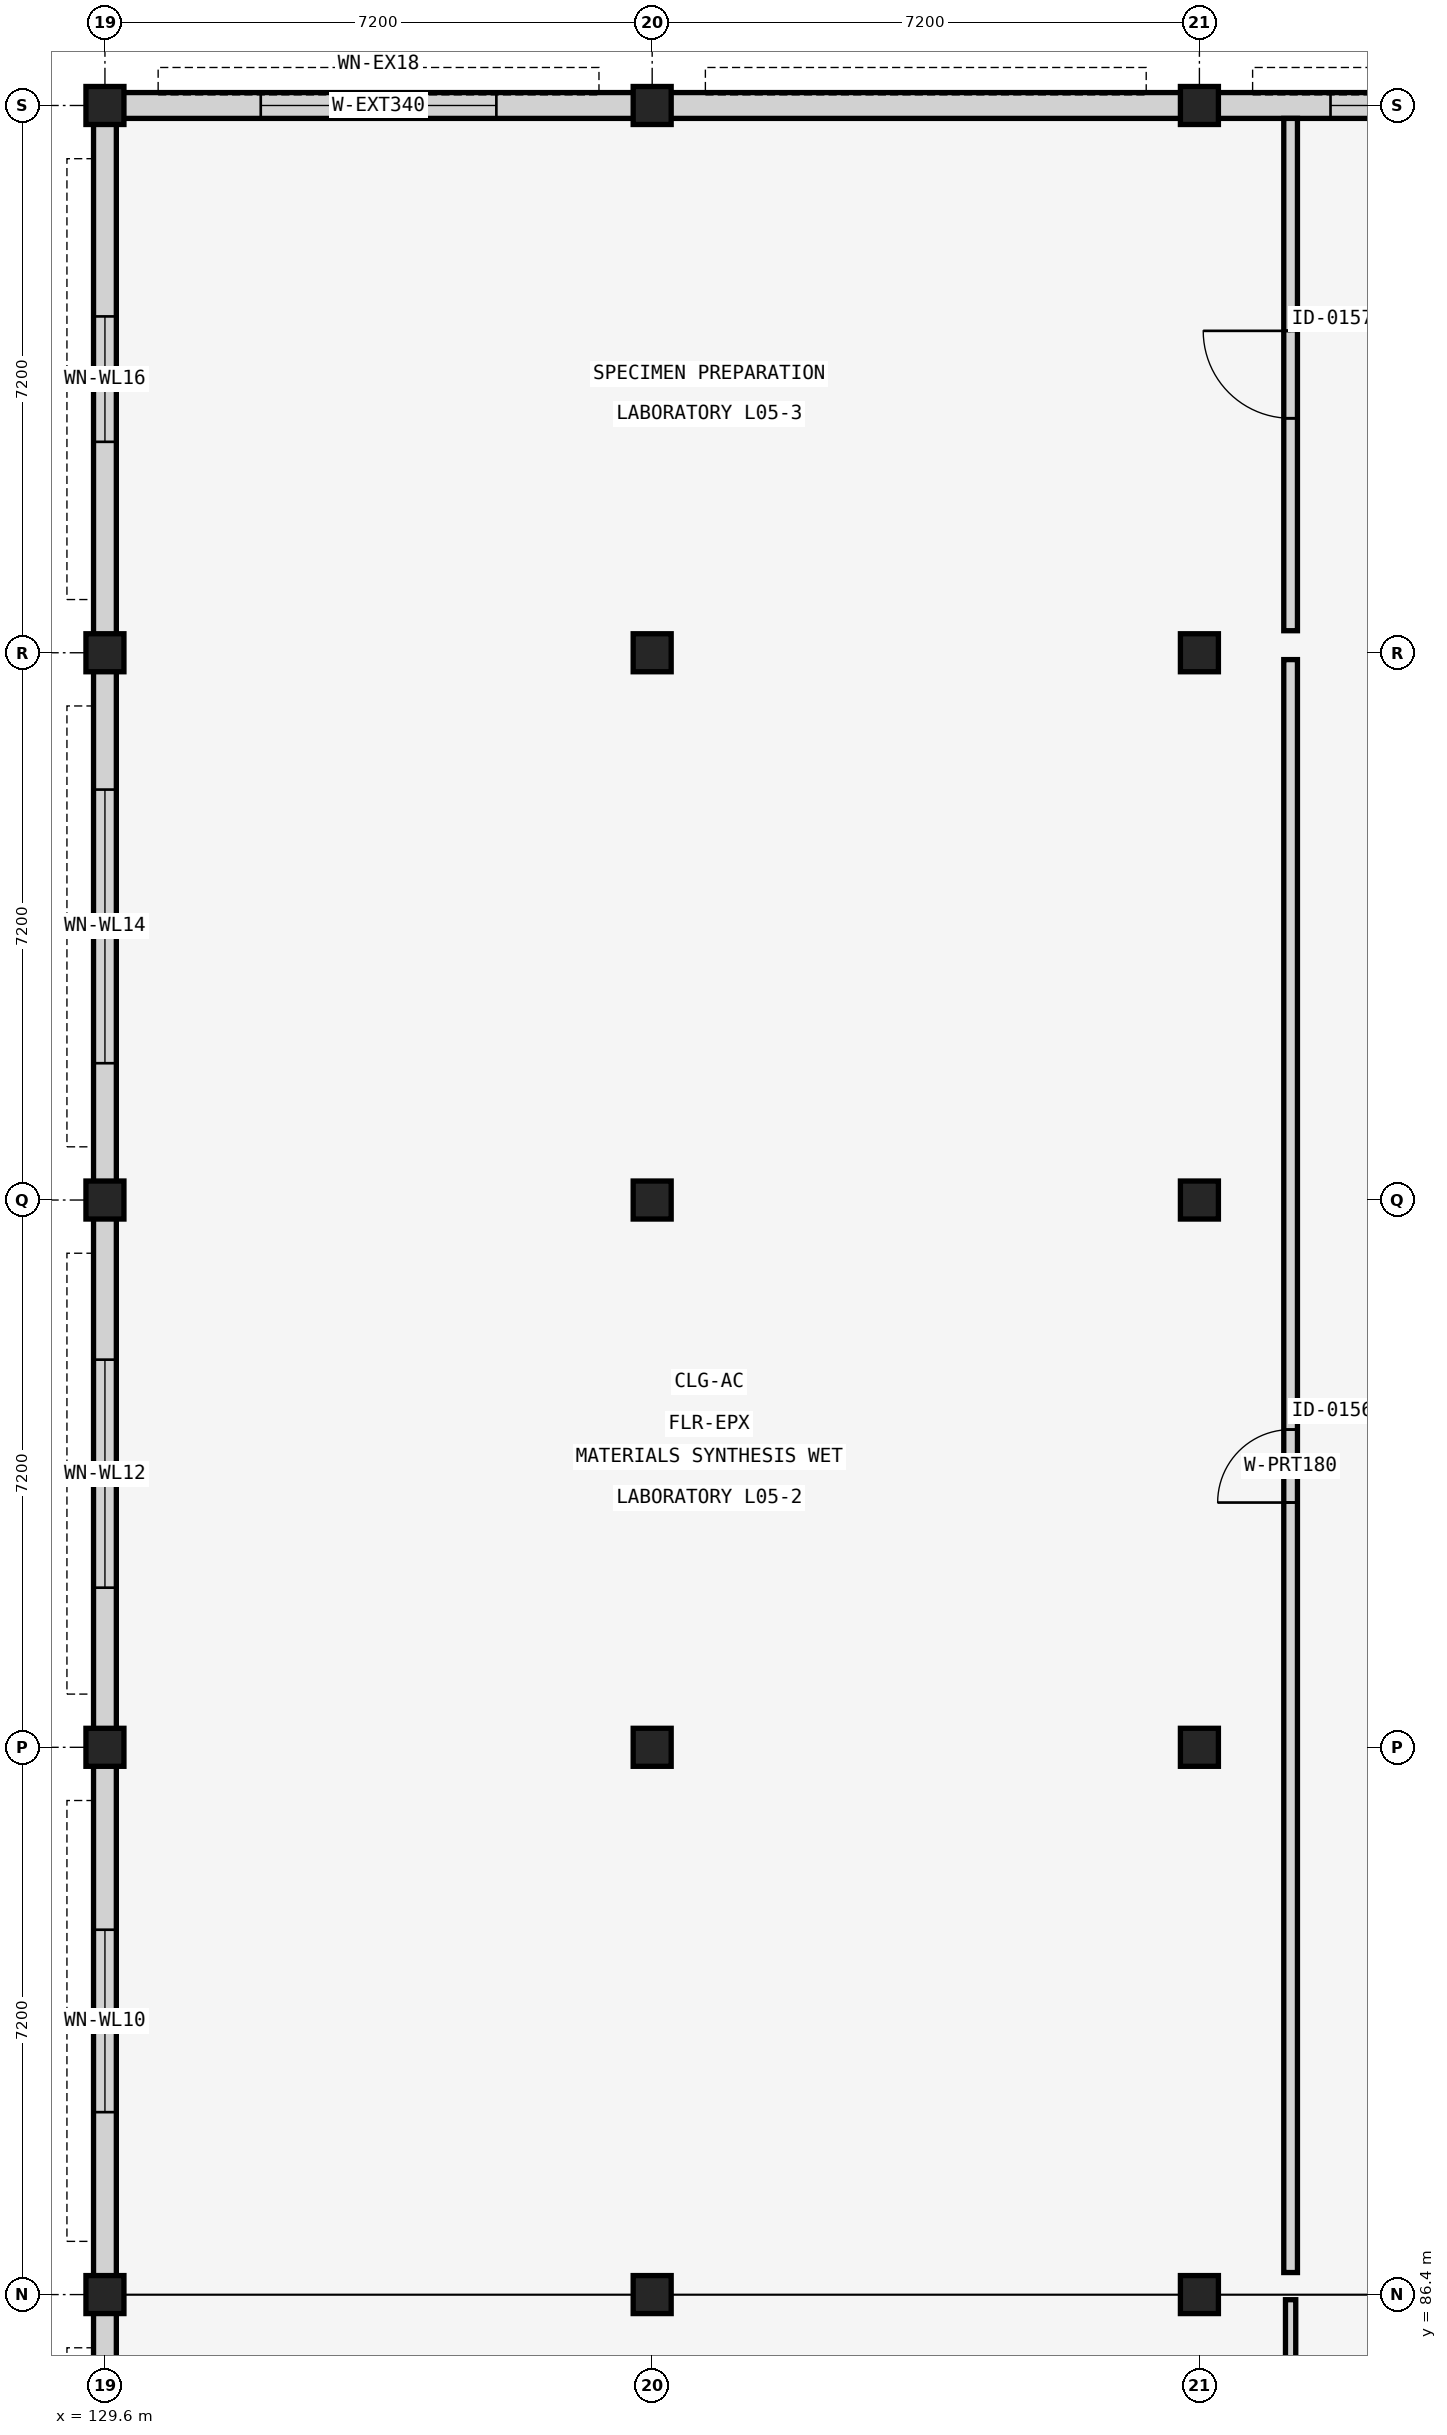
"""IFC4 building model, lengths in metres.
Left out: names, types, materials, properties, quantities, classifications, styles, units other than length and angle.
Written with IfcOpenShell. Run it as: python <this file> out.ifc"""

import sys

from ifc_helpers import new_model, si_unit, direction, frame, frame_2d, origin, origin_2d, place, context, subcontext, project, spatial, rectangle, extrude, element, fill, save


model = new_model("IFC4")
c1 = context("Model", 3, precision=1e-05, world=origin(), true_north=direction((0.0, 1.0)))
c2 = subcontext(c1, "Body", "Model", "MODEL_VIEW")
j1 = project(units=[si_unit("LENGTHUNIT", "METRE"), si_unit("PLANEANGLEUNIT", "RADIAN")], contexts=[c1])
p1 = place(None, origin())
s1 = spatial("IfcSite", under=j1, at=p1, CompositionType="ELEMENT")
p2 = place(p1, origin())
s2 = spatial("IfcBuilding", under=s1, at=p2, CompositionType="ELEMENT")
p3 = place(p2, frame((0.0, 0.0, 21.44)))
s3 = spatial("IfcBuildingStorey", under=s2, at=p3, CompositionType="ELEMENT", Elevation=21.44)
for number, where, z_axis, x_axis in (
    (1, (129.6, 86.4, 0.0), (0.0, 0.0, 1.0), (1.0, 0.0, 0.0)),
    (2, (129.6, 93.6, 0.0), (0.0, 0.0, 1.0), (1.0, 0.0, 0.0)),
    (3, (129.6, 100.8, 0.0), (0.0, 0.0, 1.0), (1.0, 0.0, 0.0)),
    (4, (129.6, 108.0, 0.0), (0.0, 0.0, 1.0), (1.0, 0.0, 0.0)),
    (5, (129.6, 115.2, 0.0), (0.0, 0.0, 1.0), (1.0, 0.0, 0.0)),
    (6, (136.8, 86.4, 0.0), (0.0, 0.0, 1.0), (1.0, 0.0, 0.0)),
    (7, (136.8, 93.6, 0.0), (0.0, 0.0, 1.0), (1.0, 0.0, 0.0)),
    (8, (136.8, 100.8, 0.0), (0.0, 0.0, 1.0), (1.0, 0.0, 0.0)),
    (9, (136.8, 108.0, 0.0), (0.0, 0.0, 1.0), (1.0, 0.0, 0.0)),
    (10, (136.8, 115.2, 0.0), (0.0, 0.0, 1.0), (1.0, 0.0, 0.0)),
    (11, (144.0, 86.4, 0.0), (0.0, 0.0, 1.0), (1.0, 0.0, 0.0)),
    (12, (144.0, 93.6, 0.0), (0.0, 0.0, 1.0), (1.0, 0.0, 0.0)),
    (13, (144.0, 100.8, 0.0), (0.0, 0.0, 1.0), (1.0, 0.0, 0.0)),
    (14, (144.0, 108.0, 0.0), (0.0, 0.0, 1.0), (1.0, 0.0, 0.0)),
    (15, (144.0, 115.2, 0.0), (0.0, 0.0, 1.0), (1.0, 0.0, 0.0)),
):
    element("IfcColumn", number, at=place(p3, frame(where, z_axis=z_axis, x_axis=x_axis)), inside=s3, PredefinedType="COLUMN", context=c2, shape_type="SweptSolid", body=[
        extrude(rectangle(XDim=0.5, YDim=0.5, at=origin_2d()), origin(), (0.0, 0.0, 1.0), 4.16),
    ])
p4 = place(p3, frame((129.84, 115.2, 0.0), z_axis=(0.0, 0.0, 1.0), x_axis=(1.0, 0.0, 0.0)))
e16 = element("IfcWall", 16, at=p4, inside=s3, PredefinedType="SOLIDWALL", context=c2, shape_type="SweptSolid", body=[
    extrude(rectangle(XDim=6.72, YDim=0.34, at=frame_2d((3.36, 0.0))), origin(), (0.0, 0.0, 1.0), 3.21),
])
p5 = place(p4, frame((1.81, 0.0, 0.95)))
e17 = element("IfcOpeningElement", 17, at=p5, cuts=e16, PredefinedType="OPENING", context=c2, shape_type="SweptSolid", body=[
    extrude(rectangle(XDim=3.1, YDim=1.75, at=frame_2d((1.55, 0.875))), frame((0.0, 0.18, 0.0), z_axis=(0.0, -1.0, 0.0), x_axis=(1.0, 0.0, 0.0)), (0.0, 0.0, 1.0), 0.36),
])
p6 = place(p3, frame((137.04, 115.2, 0.0), z_axis=(0.0, 0.0, 1.0), x_axis=(1.0, 0.0, 0.0)))
e18 = element("IfcWall", 18, at=p6, inside=s3, PredefinedType="SOLIDWALL", context=c2, shape_type="SweptSolid", body=[
    extrude(rectangle(XDim=6.72, YDim=0.34, at=frame_2d((3.36, 0.0))), origin(), (0.0, 0.0, 1.0), 3.21),
])
p7 = place(p3, frame((144.24, 115.2, 0.0), z_axis=(0.0, 0.0, 1.0), x_axis=(1.0, 0.0, 0.0)))
e19 = element("IfcWall", 19, at=p7, inside=s3, PredefinedType="SOLIDWALL", context=c2, shape_type="SweptSolid", body=[
    extrude(rectangle(XDim=6.72, YDim=0.34, at=frame_2d((3.36, 0.0))), origin(), (0.0, 0.0, 1.0), 3.21),
])
p8 = place(p7, frame((1.485, 0.0, 0.95)))
e20 = element("IfcOpeningElement", 20, at=p8, cuts=e19, PredefinedType="OPENING", context=c2, shape_type="SweptSolid", body=[
    extrude(rectangle(XDim=3.75, YDim=1.75, at=frame_2d((1.875, 0.875))), frame((0.0, 0.18, 0.0), z_axis=(0.0, -1.0, 0.0), x_axis=(1.0, 0.0, 0.0)), (0.0, 0.0, 1.0), 0.36),
])
p9 = place(p3, frame((129.6, 79.44, 0.0), z_axis=(0.0, 0.0, 1.0), x_axis=(0.0, 1.0, 0.0)))
e21 = element("IfcWall", 21, at=p9, inside=s3, PredefinedType="SOLIDWALL", context=c2, shape_type="SweptSolid", body=[
    extrude(rectangle(XDim=6.72, YDim=0.3, at=frame_2d((3.36, 0.0))), origin(), (0.0, 0.0, 1.0), 3.16),
])
p10 = place(p9, frame((2.46, 0.0, 0.95)))
e22 = element("IfcOpeningElement", 22, at=p10, cuts=e21, PredefinedType="OPENING", context=c2, shape_type="SweptSolid", body=[
    extrude(rectangle(XDim=1.8, YDim=1.8, at=frame_2d((0.9, 0.9))), frame((0.0, 0.16, 0.0), z_axis=(0.0, -1.0, 0.0), x_axis=(1.0, 0.0, 0.0)), (0.0, 0.0, 1.0), 0.32),
])
p11 = place(p3, frame((129.6, 86.64, 0.0), z_axis=(0.0, 0.0, 1.0), x_axis=(0.0, 1.0, 0.0)))
e23 = element("IfcWall", 23, at=p11, inside=s3, PredefinedType="SOLIDWALL", context=c2, shape_type="SweptSolid", body=[
    extrude(rectangle(XDim=6.72, YDim=0.3, at=frame_2d((3.36, 0.0))), origin(), (0.0, 0.0, 1.0), 3.16),
])
p12 = place(p11, frame((2.16, 0.0, 0.95)))
e24 = element("IfcOpeningElement", 24, at=p12, cuts=e23, PredefinedType="OPENING", context=c2, shape_type="SweptSolid", body=[
    extrude(rectangle(XDim=2.4, YDim=1.8, at=frame_2d((1.2, 0.9))), frame((0.0, 0.16, 0.0), z_axis=(0.0, -1.0, 0.0), x_axis=(1.0, 0.0, 0.0)), (0.0, 0.0, 1.0), 0.32),
])
p13 = place(p3, frame((129.6, 93.84, 0.0), z_axis=(0.0, 0.0, 1.0), x_axis=(0.0, 1.0, 0.0)))
e25 = element("IfcWall", 25, at=p13, inside=s3, PredefinedType="SOLIDWALL", context=c2, shape_type="SweptSolid", body=[
    extrude(rectangle(XDim=6.72, YDim=0.3, at=frame_2d((3.36, 0.0))), origin(), (0.0, 0.0, 1.0), 3.16),
])
p14 = place(p13, frame((1.86, 0.0, 0.95)))
e26 = element("IfcOpeningElement", 26, at=p14, cuts=e25, PredefinedType="OPENING", context=c2, shape_type="SweptSolid", body=[
    extrude(rectangle(XDim=3.0, YDim=1.8, at=frame_2d((1.5, 0.9))), frame((0.0, 0.16, 0.0), z_axis=(0.0, -1.0, 0.0), x_axis=(1.0, 0.0, 0.0)), (0.0, 0.0, 1.0), 0.32),
])
p15 = place(p3, frame((129.6, 101.04, 0.0), z_axis=(0.0, 0.0, 1.0), x_axis=(0.0, 1.0, 0.0)))
e27 = element("IfcWall", 27, at=p15, inside=s3, PredefinedType="SOLIDWALL", context=c2, shape_type="SweptSolid", body=[
    extrude(rectangle(XDim=6.72, YDim=0.3, at=frame_2d((3.36, 0.0))), origin(), (0.0, 0.0, 1.0), 3.16),
])
p16 = place(p15, frame((1.56, 0.0, 0.95)))
e28 = element("IfcOpeningElement", 28, at=p16, cuts=e27, PredefinedType="OPENING", context=c2, shape_type="SweptSolid", body=[
    extrude(rectangle(XDim=3.6, YDim=1.8, at=frame_2d((1.8, 0.9))), frame((0.0, 0.16, 0.0), z_axis=(0.0, -1.0, 0.0), x_axis=(1.0, 0.0, 0.0)), (0.0, 0.0, 1.0), 0.32),
])
p17 = place(p3, frame((129.6, 108.24, 0.0), z_axis=(0.0, 0.0, 1.0), x_axis=(0.0, 1.0, 0.0)))
e29 = element("IfcWall", 29, at=p17, inside=s3, PredefinedType="SOLIDWALL", context=c2, shape_type="SweptSolid", body=[
    extrude(rectangle(XDim=6.72, YDim=0.3, at=frame_2d((3.36, 0.0))), origin(), (0.0, 0.0, 1.0), 3.16),
])
p18 = place(p17, frame((2.535, 0.0, 0.95)))
e30 = element("IfcOpeningElement", 30, at=p18, cuts=e29, PredefinedType="OPENING", context=c2, shape_type="SweptSolid", body=[
    extrude(rectangle(XDim=1.65, YDim=1.95, at=frame_2d((0.825, 0.975))), frame((0.0, 0.16, 0.0), z_axis=(0.0, -1.0, 0.0), x_axis=(1.0, 0.0, 0.0)), (0.0, 0.0, 1.0), 0.32),
])
p19 = place(p3, frame((145.2, 57.74, 0.0), z_axis=(0.0, 0.0, 1.0), x_axis=(0.0, 1.0, 0.0)))
e31 = element("IfcWall", 31, at=p19, inside=s3, PredefinedType="PARTITIONING", context=c2, shape_type="SweptSolid", body=[
    extrude(rectangle(XDim=28.593, YDim=0.135, at=frame_2d((14.296, 0.0))), origin(), (0.0, 0.0, 1.0), 3.16),
])
p20 = place(p19, frame((9.547, 0.0, 0.0)))
e32 = element("IfcOpeningElement", 32, at=p20, cuts=e31, PredefinedType="OPENING", context=c2, shape_type="SweptSolid", body=[
    extrude(rectangle(XDim=0.92, YDim=2.15, at=frame_2d((0.46, 1.075))), frame((0.0, 0.078, 0.0), z_axis=(0.0, -1.0, 0.0), x_axis=(1.0, 0.0, 0.0)), (0.0, 0.0, 1.0), 0.155),
])
p21 = place(p3, frame((145.2, 86.69, 0.0), z_axis=(0.0, 0.0, 1.0), x_axis=(0.0, 1.0, 0.0)))
e33 = element("IfcWall", 33, at=p21, inside=s3, PredefinedType="PARTITIONING", context=c2, shape_type="SweptSolid", body=[
    extrude(rectangle(XDim=21.22, YDim=0.18, at=frame_2d((10.61, 0.0))), origin(), (0.0, 0.0, 1.0), 3.16),
])
p22 = place(p21, frame((10.13, 0.0, 0.0)))
e34 = element("IfcOpeningElement", 34, at=p22, cuts=e33, PredefinedType="OPENING", context=c2, shape_type="SweptSolid", body=[
    extrude(rectangle(XDim=0.96, YDim=2.15, at=frame_2d((0.48, 1.075))), frame((0.0, 0.1, 0.0), z_axis=(0.0, -1.0, 0.0), x_axis=(1.0, 0.0, 0.0)), (0.0, 0.0, 1.0), 0.2),
])
p23 = place(p3, frame((145.2, 108.29, 0.0), z_axis=(0.0, 0.0, 1.0), x_axis=(0.0, 1.0, 0.0)))
e35 = element("IfcWall", 35, at=p23, inside=s3, PredefinedType="PARTITIONING", context=c2, shape_type="SweptSolid", body=[
    extrude(rectangle(XDim=6.74, YDim=0.18, at=frame_2d((3.37, 0.0))), origin(), (0.0, 0.0, 1.0), 3.16),
])
p24 = place(p23, frame((2.795, 0.0, 0.0)))
e36 = element("IfcOpeningElement", 36, at=p24, cuts=e35, PredefinedType="OPENING", context=c2, shape_type="SweptSolid", body=[
    extrude(rectangle(XDim=1.15, YDim=2.15, at=frame_2d((0.575, 1.075))), frame((0.0, 0.1, 0.0), z_axis=(0.0, -1.0, 0.0), x_axis=(1.0, 0.0, 0.0)), (0.0, 0.0, 1.0), 0.2),
])
p25 = place(p5, origin())
e37 = element("IfcWindow", 37, at=p25, inside=s3, PartitioningType="SINGLE_PANEL", PredefinedType="WINDOW", context=c2, shape_type="SweptSolid", body=[
    extrude(rectangle(XDim=3.1, YDim=1.75, at=frame_2d((1.55, 0.875))), frame((0.0, 0.03, 0.0), z_axis=(0.0, -1.0, 0.0), x_axis=(1.0, 0.0, 0.0)), (0.0, 0.0, 1.0), 0.06),
])
fill(e17, e37)
p26 = place(p8, origin())
e38 = element("IfcWindow", 38, at=p26, inside=s3, PartitioningType="SINGLE_PANEL", PredefinedType="WINDOW", context=c2, shape_type="SweptSolid", body=[
    extrude(rectangle(XDim=3.75, YDim=1.75, at=frame_2d((1.875, 0.875))), frame((0.0, 0.03, 0.0), z_axis=(0.0, -1.0, 0.0), x_axis=(1.0, 0.0, 0.0)), (0.0, 0.0, 1.0), 0.06),
])
fill(e20, e38)
p27 = place(p12, origin())
e39 = element("IfcWindow", 39, at=p27, inside=s3, PartitioningType="SINGLE_PANEL", PredefinedType="WINDOW", context=c2, shape_type="SweptSolid", body=[
    extrude(rectangle(XDim=2.4, YDim=1.8, at=frame_2d((1.2, 0.9))), frame((0.0, 0.03, 0.0), z_axis=(0.0, -1.0, 0.0), x_axis=(1.0, 0.0, 0.0)), (0.0, 0.0, 1.0), 0.06),
])
fill(e24, e39)
p28 = place(p14, origin())
e40 = element("IfcWindow", 40, at=p28, inside=s3, PartitioningType="SINGLE_PANEL", PredefinedType="WINDOW", context=c2, shape_type="SweptSolid", body=[
    extrude(rectangle(XDim=3.0, YDim=1.8, at=frame_2d((1.5, 0.9))), frame((0.0, 0.03, 0.0), z_axis=(0.0, -1.0, 0.0), x_axis=(1.0, 0.0, 0.0)), (0.0, 0.0, 1.0), 0.06),
])
fill(e26, e40)
p29 = place(p16, origin())
e41 = element("IfcWindow", 41, at=p29, inside=s3, PartitioningType="SINGLE_PANEL", PredefinedType="WINDOW", context=c2, shape_type="SweptSolid", body=[
    extrude(rectangle(XDim=3.6, YDim=1.8, at=frame_2d((1.8, 0.9))), frame((0.0, 0.03, 0.0), z_axis=(0.0, -1.0, 0.0), x_axis=(1.0, 0.0, 0.0)), (0.0, 0.0, 1.0), 0.06),
])
fill(e28, e41)
p30 = place(p18, origin())
e42 = element("IfcWindow", 42, at=p30, inside=s3, PartitioningType="SINGLE_PANEL", PredefinedType="WINDOW", context=c2, shape_type="SweptSolid", body=[
    extrude(rectangle(XDim=1.65, YDim=1.95, at=frame_2d((0.825, 0.975))), frame((0.0, 0.03, 0.0), z_axis=(0.0, -1.0, 0.0), x_axis=(1.0, 0.0, 0.0)), (0.0, 0.0, 1.0), 0.06),
])
fill(e30, e42)
p31 = place(p22, origin())
e43 = element("IfcDoor", 43, at=p31, inside=s3, OperationType="SINGLE_SWING_LEFT", PredefinedType="DOOR", context=c2, shape_type="SweptSolid", body=[
    extrude(rectangle(XDim=0.96, YDim=2.15, at=frame_2d((0.48, 1.075))), frame((0.0, 0.025, 0.0), z_axis=(0.0, -1.0, 0.0), x_axis=(1.0, 0.0, 0.0)), (0.0, 0.0, 1.0), 0.05),
])
fill(e34, e43)
p32 = place(p24, origin())
e44 = element("IfcDoor", 44, at=p32, inside=s3, OperationType="SINGLE_SWING_RIGHT", PredefinedType="DOOR", context=c2, shape_type="SweptSolid", body=[
    extrude(rectangle(XDim=1.15, YDim=2.15, at=frame_2d((0.575, 1.075))), frame((0.0, 0.025, 0.0), z_axis=(0.0, -1.0, 0.0), x_axis=(1.0, 0.0, 0.0)), (0.0, 0.0, 1.0), 0.05),
])
fill(e36, e44)
save(model, sys.argv[1])
